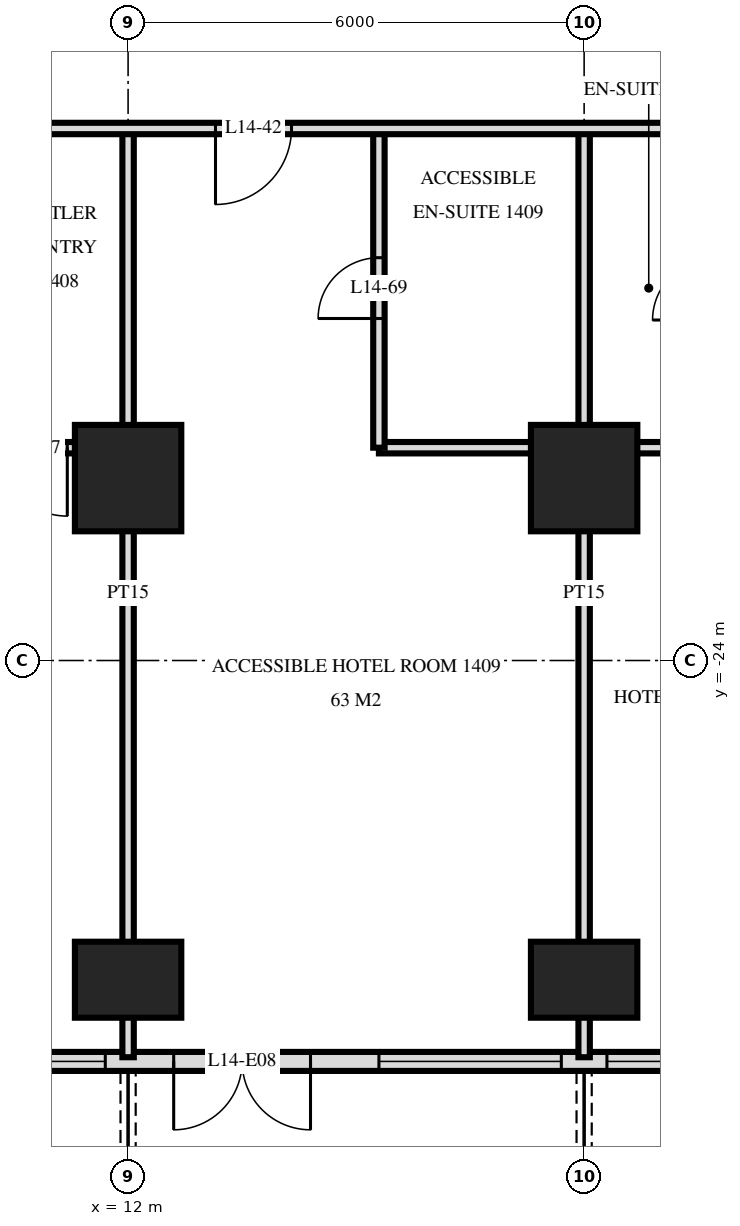
"""IFC4 building model, lengths in metres.
Left out: names, types, materials, properties, quantities, classifications, styles, units other than length and angle.
Written with IfcOpenShell. Run it as: python <this file> out.ifc"""

import sys

from ifc_helpers import new_model, si_unit, direction, frame, frame_2d, origin, origin_2d, place, context, subcontext, project, spatial, rectangle, extrude, element, fill, save


model = new_model("IFC4")
c1 = context("Model", 3, precision=1e-05, world=origin(), true_north=direction((0.0, 1.0)))
c2 = subcontext(c1, "Body", "Model", "MODEL_VIEW")
j1 = project(units=[si_unit("LENGTHUNIT", "METRE"), si_unit("PLANEANGLEUNIT", "RADIAN")], contexts=[c1])
p1 = place(None, origin())
s1 = spatial("IfcSite", under=j1, at=p1, CompositionType="ELEMENT")
p2 = place(p1, origin())
s2 = spatial("IfcBuilding", under=s1, at=p2, CompositionType="ELEMENT")
p3 = place(p2, frame((0.0, 0.0, 60.0)))
s3 = spatial("IfcBuildingStorey", under=s2, at=p3, CompositionType="ELEMENT", Elevation=60.0)
p4 = place(p3, frame((12.0, -28.2, 0.0), z_axis=(0.0, 0.0, 1.0), x_axis=(1.0, 0.0, 0.0)))
e1 = element("IfcColumn", 1, at=p4, inside=s3, PredefinedType="COLUMN", context=c2, shape_type="SweptSolid", body=[
    extrude(rectangle(XDim=1.4, YDim=1.0, at=origin_2d()), origin(), (0.0, 0.0, 1.0), 3.6),
])
p5 = place(p3, frame((12.0, -21.6, 0.0), z_axis=(0.0, 0.0, 1.0), x_axis=(1.0, 0.0, 0.0)))
e2 = element("IfcColumn", 2, at=p5, inside=s3, PredefinedType="COLUMN", context=c2, shape_type="SweptSolid", body=[
    extrude(rectangle(XDim=1.4, YDim=1.4, at=origin_2d()), origin(), (0.0, 0.0, 1.0), 3.6),
])
p6 = place(p3, frame((18.0, -28.2, 0.0), z_axis=(0.0, 0.0, 1.0), x_axis=(1.0, 0.0, 0.0)))
e3 = element("IfcColumn", 3, at=p6, inside=s3, PredefinedType="COLUMN", context=c2, shape_type="SweptSolid", body=[
    extrude(rectangle(XDim=1.4, YDim=1.0, at=origin_2d()), origin(), (0.0, 0.0, 1.0), 3.6),
])
p7 = place(p3, frame((18.0, -21.6, 0.0), z_axis=(0.0, 0.0, 1.0), x_axis=(1.0, 0.0, 0.0)))
e4 = element("IfcColumn", 4, at=p7, inside=s3, PredefinedType="COLUMN", context=c2, shape_type="SweptSolid", body=[
    extrude(rectangle(XDim=1.4, YDim=1.4, at=origin_2d()), origin(), (0.0, 0.0, 1.0), 3.6),
])
p8 = place(p3, frame((-28.775, -29.275, 0.0), z_axis=(0.0, 0.0, 1.0), x_axis=(1.0, 0.0, 0.0)))
e5 = element("IfcWall", 5, at=p8, inside=s3, PredefinedType="SOLIDWALL", context=c2, shape_type="SweptSolid", body=[
    extrude(rectangle(XDim=57.551, YDim=0.25, at=frame_2d((28.775, 0.0))), origin(), (0.0, 0.0, 1.0), 3.32),
])
p9 = place(p8, frame((0.575, 0.0, 0.0)))
e6 = element("IfcOpeningElement", 6, at=p9, cuts=e5, PredefinedType="OPENING", context=c2, shape_type="SweptSolid", body=[
    extrude(rectangle(XDim=1.8, YDim=2.4, at=frame_2d((0.9, 1.2))), frame((0.0, 0.135, 0.0), z_axis=(0.0, -1.0, 0.0), x_axis=(1.0, 0.0, 0.0)), (0.0, 0.0, 1.0), 0.27),
])
p10 = place(p8, frame((5.375, 0.0, 0.0)))
e7 = element("IfcOpeningElement", 7, at=p10, cuts=e5, PredefinedType="OPENING", context=c2, shape_type="SweptSolid", body=[
    extrude(rectangle(XDim=1.8, YDim=2.4, at=frame_2d((0.9, 1.2))), frame((0.0, 0.135, 0.0), z_axis=(0.0, -1.0, 0.0), x_axis=(1.0, 0.0, 0.0)), (0.0, 0.0, 1.0), 0.27),
])
p11 = place(p8, frame((8.075, 0.0, 0.3)))
e8 = element("IfcOpeningElement", 8, at=p11, cuts=e5, PredefinedType="OPENING", context=c2, shape_type="SweptSolid", body=[
    extrude(rectangle(XDim=2.4, YDim=2.1, at=frame_2d((1.2, 1.05))), frame((0.0, 0.135, 0.0), z_axis=(0.0, -1.0, 0.0), x_axis=(1.0, 0.0, 0.0)), (0.0, 0.0, 1.0), 0.27),
])
p12 = place(p8, frame((11.375, 0.0, 0.0)))
e9 = element("IfcOpeningElement", 9, at=p12, cuts=e5, PredefinedType="OPENING", context=c2, shape_type="SweptSolid", body=[
    extrude(rectangle(XDim=1.8, YDim=2.4, at=frame_2d((0.9, 1.2))), frame((0.0, 0.135, 0.0), z_axis=(0.0, -1.0, 0.0), x_axis=(1.0, 0.0, 0.0)), (0.0, 0.0, 1.0), 0.27),
])
p13 = place(p8, frame((14.075, 0.0, 0.3)))
e10 = element("IfcOpeningElement", 10, at=p13, cuts=e5, PredefinedType="OPENING", context=c2, shape_type="SweptSolid", body=[
    extrude(rectangle(XDim=2.4, YDim=2.1, at=frame_2d((1.2, 1.05))), frame((0.0, 0.135, 0.0), z_axis=(0.0, -1.0, 0.0), x_axis=(1.0, 0.0, 0.0)), (0.0, 0.0, 1.0), 0.27),
])
p14 = place(p8, frame((17.375, 0.0, 0.0)))
e11 = element("IfcOpeningElement", 11, at=p14, cuts=e5, PredefinedType="OPENING", context=c2, shape_type="SweptSolid", body=[
    extrude(rectangle(XDim=1.8, YDim=2.4, at=frame_2d((0.9, 1.2))), frame((0.0, 0.135, 0.0), z_axis=(0.0, -1.0, 0.0), x_axis=(1.0, 0.0, 0.0)), (0.0, 0.0, 1.0), 0.27),
])
p15 = place(p8, frame((20.075, 0.0, 0.3)))
e12 = element("IfcOpeningElement", 12, at=p15, cuts=e5, PredefinedType="OPENING", context=c2, shape_type="SweptSolid", body=[
    extrude(rectangle(XDim=2.4, YDim=2.1, at=frame_2d((1.2, 1.05))), frame((0.0, 0.135, 0.0), z_axis=(0.0, -1.0, 0.0), x_axis=(1.0, 0.0, 0.0)), (0.0, 0.0, 1.0), 0.27),
])
p16 = place(p8, frame((23.075, 0.0, 0.3)))
e13 = element("IfcOpeningElement", 13, at=p16, cuts=e5, PredefinedType="OPENING", context=c2, shape_type="SweptSolid", body=[
    extrude(rectangle(XDim=2.4, YDim=2.1, at=frame_2d((1.2, 1.05))), frame((0.0, 0.135, 0.0), z_axis=(0.0, -1.0, 0.0), x_axis=(1.0, 0.0, 0.0)), (0.0, 0.0, 1.0), 0.27),
])
p17 = place(p8, frame((26.375, 0.0, 0.0)))
e14 = element("IfcOpeningElement", 14, at=p17, cuts=e5, PredefinedType="OPENING", context=c2, shape_type="SweptSolid", body=[
    extrude(rectangle(XDim=1.8, YDim=2.4, at=frame_2d((0.9, 1.2))), frame((0.0, 0.135, 0.0), z_axis=(0.0, -1.0, 0.0), x_axis=(1.0, 0.0, 0.0)), (0.0, 0.0, 1.0), 0.27),
])
p18 = place(p8, frame((29.075, 0.0, 0.3)))
e15 = element("IfcOpeningElement", 15, at=p18, cuts=e5, PredefinedType="OPENING", context=c2, shape_type="SweptSolid", body=[
    extrude(rectangle(XDim=2.4, YDim=2.1, at=frame_2d((1.2, 1.05))), frame((0.0, 0.135, 0.0), z_axis=(0.0, -1.0, 0.0), x_axis=(1.0, 0.0, 0.0)), (0.0, 0.0, 1.0), 0.27),
])
p19 = place(p8, frame((32.375, 0.0, 0.0)))
e16 = element("IfcOpeningElement", 16, at=p19, cuts=e5, PredefinedType="OPENING", context=c2, shape_type="SweptSolid", body=[
    extrude(rectangle(XDim=1.8, YDim=2.4, at=frame_2d((0.9, 1.2))), frame((0.0, 0.135, 0.0), z_axis=(0.0, -1.0, 0.0), x_axis=(1.0, 0.0, 0.0)), (0.0, 0.0, 1.0), 0.27),
])
p20 = place(p8, frame((35.375, 0.0, 0.0)))
e17 = element("IfcOpeningElement", 17, at=p20, cuts=e5, PredefinedType="OPENING", context=c2, shape_type="SweptSolid", body=[
    extrude(rectangle(XDim=1.8, YDim=2.4, at=frame_2d((0.9, 1.2))), frame((0.0, 0.135, 0.0), z_axis=(0.0, -1.0, 0.0), x_axis=(1.0, 0.0, 0.0)), (0.0, 0.0, 1.0), 0.27),
])
p21 = place(p8, frame((38.075, 0.0, 0.3)))
e18 = element("IfcOpeningElement", 18, at=p21, cuts=e5, PredefinedType="OPENING", context=c2, shape_type="SweptSolid", body=[
    extrude(rectangle(XDim=2.4, YDim=2.1, at=frame_2d((1.2, 1.05))), frame((0.0, 0.135, 0.0), z_axis=(0.0, -1.0, 0.0), x_axis=(1.0, 0.0, 0.0)), (0.0, 0.0, 1.0), 0.27),
])
p22 = place(p8, frame((41.375, 0.0, 0.0)))
e19 = element("IfcOpeningElement", 19, at=p22, cuts=e5, PredefinedType="OPENING", context=c2, shape_type="SweptSolid", body=[
    extrude(rectangle(XDim=1.8, YDim=2.4, at=frame_2d((0.9, 1.2))), frame((0.0, 0.135, 0.0), z_axis=(0.0, -1.0, 0.0), x_axis=(1.0, 0.0, 0.0)), (0.0, 0.0, 1.0), 0.27),
])
p23 = place(p8, frame((44.075, 0.0, 0.3)))
e20 = element("IfcOpeningElement", 20, at=p23, cuts=e5, PredefinedType="OPENING", context=c2, shape_type="SweptSolid", body=[
    extrude(rectangle(XDim=2.4, YDim=2.1, at=frame_2d((1.2, 1.05))), frame((0.0, 0.135, 0.0), z_axis=(0.0, -1.0, 0.0), x_axis=(1.0, 0.0, 0.0)), (0.0, 0.0, 1.0), 0.27),
])
p24 = place(p8, frame((47.075, 0.0, 0.3)))
e21 = element("IfcOpeningElement", 21, at=p24, cuts=e5, PredefinedType="OPENING", context=c2, shape_type="SweptSolid", body=[
    extrude(rectangle(XDim=2.4, YDim=2.1, at=frame_2d((1.2, 1.05))), frame((0.0, 0.135, 0.0), z_axis=(0.0, -1.0, 0.0), x_axis=(1.0, 0.0, 0.0)), (0.0, 0.0, 1.0), 0.27),
])
p25 = place(p8, frame((50.375, 0.0, 0.0)))
e22 = element("IfcOpeningElement", 22, at=p25, cuts=e5, PredefinedType="OPENING", context=c2, shape_type="SweptSolid", body=[
    extrude(rectangle(XDim=1.8, YDim=2.4, at=frame_2d((0.9, 1.2))), frame((0.0, 0.135, 0.0), z_axis=(0.0, -1.0, 0.0), x_axis=(1.0, 0.0, 0.0)), (0.0, 0.0, 1.0), 0.27),
])
p26 = place(p8, frame((53.375, 0.0, 0.0)))
e23 = element("IfcOpeningElement", 23, at=p26, cuts=e5, PredefinedType="OPENING", context=c2, shape_type="SweptSolid", body=[
    extrude(rectangle(XDim=1.8, YDim=2.4, at=frame_2d((0.9, 1.2))), frame((0.0, 0.135, 0.0), z_axis=(0.0, -1.0, 0.0), x_axis=(1.0, 0.0, 0.0)), (0.0, 0.0, 1.0), 0.27),
])
p27 = place(p3, frame((18.0, -29.22, 0.0), z_axis=(0.0, 0.0, 1.0), x_axis=(0.0, 1.0, 0.0)))
e24 = element("IfcWall", 24, at=p27, inside=s3, PredefinedType="PARTITIONING", context=c2, shape_type="SweptSolid", body=[
    extrude(rectangle(XDim=12.22, YDim=0.15, at=frame_2d((6.11, 0.0))), origin(), (0.0, 0.0, 1.0), 3.32),
])
p28 = place(p3, frame((15.3, -21.2, 0.0), z_axis=(0.0, 0.0, 1.0), x_axis=(0.0, 1.0, 0.0)))
e25 = element("IfcWall", 25, at=p28, inside=s3, PredefinedType="PARTITIONING", context=c2, shape_type="SweptSolid", body=[
    extrude(rectangle(XDim=4.2, YDim=0.15, at=frame_2d((2.1, 0.0))), origin(), (0.0, 0.0, 1.0), 3.32),
])
p29 = place(p28, frame((1.7, 0.0, 0.0)))
e26 = element("IfcOpeningElement", 26, at=p29, cuts=e25, PredefinedType="OPENING", context=c2, shape_type="SweptSolid", body=[
    extrude(rectangle(XDim=0.8, YDim=2.1, at=frame_2d((0.4, 1.05))), frame((0.0, 0.085, 0.0), z_axis=(0.0, -1.0, 0.0), x_axis=(1.0, 0.0, 0.0)), (0.0, 0.0, 1.0), 0.17),
])
p30 = place(p3, frame((12.0, -29.22, 0.0), z_axis=(0.0, 0.0, 1.0), x_axis=(0.0, 1.0, 0.0)))
e27 = element("IfcWall", 27, at=p30, inside=s3, PredefinedType="PARTITIONING", context=c2, shape_type="SweptSolid", body=[
    extrude(rectangle(XDim=12.22, YDim=0.15, at=frame_2d((6.11, 0.0))), origin(), (0.0, 0.0, 1.0), 3.32),
])
p31 = place(p3, frame((4.2, -21.2, 0.0), z_axis=(0.0, 0.0, 1.0), x_axis=(1.0, 0.0, 0.0)))
e28 = element("IfcWall", 28, at=p31, inside=s3, PredefinedType="PARTITIONING", context=c2, shape_type="SweptSolid", body=[
    extrude(rectangle(XDim=7.8, YDim=0.15, at=frame_2d((3.9, 0.0))), origin(), (0.0, 0.0, 1.0), 3.32),
])
p32 = place(p31, frame((0.2, 0.0, 0.0)))
e29 = element("IfcOpeningElement", 29, at=p32, cuts=e28, PredefinedType="OPENING", context=c2, shape_type="SweptSolid", body=[
    extrude(rectangle(XDim=0.8, YDim=2.1, at=frame_2d((0.4, 1.05))), frame((0.0, 0.085, 0.0), z_axis=(0.0, -1.0, 0.0), x_axis=(1.0, 0.0, 0.0)), (0.0, 0.0, 1.0), 0.17),
])
p33 = place(p31, frame((4.03, 0.0, 0.0)))
e30 = element("IfcOpeningElement", 30, at=p33, cuts=e28, PredefinedType="OPENING", context=c2, shape_type="SweptSolid", body=[
    extrude(rectangle(XDim=0.9, YDim=2.1, at=frame_2d((0.45, 1.05))), frame((0.0, 0.085, 0.0), z_axis=(0.0, -1.0, 0.0), x_axis=(1.0, 0.0, 0.0)), (0.0, 0.0, 1.0), 0.17),
])
p34 = place(p31, frame((6.1, 0.0, 0.0)))
e31 = element("IfcOpeningElement", 31, at=p34, cuts=e28, PredefinedType="OPENING", context=c2, shape_type="SweptSolid", body=[
    extrude(rectangle(XDim=0.9, YDim=2.1, at=frame_2d((0.45, 1.05))), frame((0.0, 0.085, 0.0), z_axis=(0.0, -1.0, 0.0), x_axis=(1.0, 0.0, 0.0)), (0.0, 0.0, 1.0), 0.17),
])
p35 = place(p3, frame((15.3, -21.2, 0.0), z_axis=(0.0, 0.0, 1.0), x_axis=(1.0, 0.0, 0.0)))
e32 = element("IfcWall", 32, at=p35, inside=s3, PredefinedType="PARTITIONING", context=c2, shape_type="SweptSolid", body=[
    extrude(rectangle(XDim=4.4, YDim=0.15, at=frame_2d((2.2, 0.0))), origin(), (0.0, 0.0, 1.0), 3.32),
])
p36 = place(p3, frame((-33.12, -17.0, 0.0), z_axis=(0.0, 0.0, 1.0), x_axis=(1.0, 0.0, 0.0)))
e33 = element("IfcWall", 33, at=p36, inside=s3, PredefinedType="PARTITIONING", context=c2, shape_type="SweptSolid", body=[
    extrude(rectangle(XDim=66.24, YDim=0.15, at=frame_2d((33.12, 0.0))), origin(), (0.0, 0.0, 1.0), 3.32),
])
p37 = place(p36, frame((12.27, 0.0, 0.0)))
e34 = element("IfcOpeningElement", 34, at=p37, cuts=e33, PredefinedType="OPENING", context=c2, shape_type="SweptSolid", body=[
    extrude(rectangle(XDim=1.0, YDim=2.1, at=frame_2d((0.5, 1.05))), frame((0.0, 0.085, 0.0), z_axis=(0.0, -1.0, 0.0), x_axis=(1.0, 0.0, 0.0)), (0.0, 0.0, 1.0), 0.17),
])
p38 = place(p36, frame((16.97, 0.0, 0.0)))
e35 = element("IfcOpeningElement", 35, at=p38, cuts=e33, PredefinedType="OPENING", context=c2, shape_type="SweptSolid", body=[
    extrude(rectangle(XDim=1.0, YDim=2.1, at=frame_2d((0.5, 1.05))), frame((0.0, 0.085, 0.0), z_axis=(0.0, -1.0, 0.0), x_axis=(1.0, 0.0, 0.0)), (0.0, 0.0, 1.0), 0.17),
])
p39 = place(p36, frame((18.27, 0.0, 0.0)))
e36 = element("IfcOpeningElement", 36, at=p39, cuts=e33, PredefinedType="OPENING", context=c2, shape_type="SweptSolid", body=[
    extrude(rectangle(XDim=1.0, YDim=2.1, at=frame_2d((0.5, 1.05))), frame((0.0, 0.085, 0.0), z_axis=(0.0, -1.0, 0.0), x_axis=(1.0, 0.0, 0.0)), (0.0, 0.0, 1.0), 0.17),
])
p40 = place(p36, frame((22.97, 0.0, 0.0)))
e37 = element("IfcOpeningElement", 37, at=p40, cuts=e33, PredefinedType="OPENING", context=c2, shape_type="SweptSolid", body=[
    extrude(rectangle(XDim=1.0, YDim=2.1, at=frame_2d((0.5, 1.05))), frame((0.0, 0.085, 0.0), z_axis=(0.0, -1.0, 0.0), x_axis=(1.0, 0.0, 0.0)), (0.0, 0.0, 1.0), 0.17),
])
p41 = place(p36, frame((24.27, 0.0, 0.0)))
e38 = element("IfcOpeningElement", 38, at=p41, cuts=e33, PredefinedType="OPENING", context=c2, shape_type="SweptSolid", body=[
    extrude(rectangle(XDim=1.0, YDim=2.1, at=frame_2d((0.5, 1.05))), frame((0.0, 0.085, 0.0), z_axis=(0.0, -1.0, 0.0), x_axis=(1.0, 0.0, 0.0)), (0.0, 0.0, 1.0), 0.17),
])
p42 = place(p36, frame((28.97, 0.0, 0.0)))
e39 = element("IfcOpeningElement", 39, at=p42, cuts=e33, PredefinedType="OPENING", context=c2, shape_type="SweptSolid", body=[
    extrude(rectangle(XDim=1.0, YDim=2.1, at=frame_2d((0.5, 1.05))), frame((0.0, 0.085, 0.0), z_axis=(0.0, -1.0, 0.0), x_axis=(1.0, 0.0, 0.0)), (0.0, 0.0, 1.0), 0.17),
])
p43 = place(p36, frame((30.27, 0.0, 0.0)))
e40 = element("IfcOpeningElement", 40, at=p43, cuts=e33, PredefinedType="OPENING", context=c2, shape_type="SweptSolid", body=[
    extrude(rectangle(XDim=1.0, YDim=2.1, at=frame_2d((0.5, 1.05))), frame((0.0, 0.085, 0.0), z_axis=(0.0, -1.0, 0.0), x_axis=(1.0, 0.0, 0.0)), (0.0, 0.0, 1.0), 0.17),
])
p44 = place(p36, frame((33.82, 0.0, 0.0)))
e41 = element("IfcOpeningElement", 41, at=p44, cuts=e33, PredefinedType="OPENING", context=c2, shape_type="SweptSolid", body=[
    extrude(rectangle(XDim=1.0, YDim=2.1, at=frame_2d((0.5, 1.05))), frame((0.0, 0.085, 0.0), z_axis=(0.0, -1.0, 0.0), x_axis=(1.0, 0.0, 0.0)), (0.0, 0.0, 1.0), 0.17),
])
p45 = place(p36, frame((46.27, 0.0, 0.0)))
e42 = element("IfcOpeningElement", 42, at=p45, cuts=e33, PredefinedType="OPENING", context=c2, shape_type="SweptSolid", body=[
    extrude(rectangle(XDim=1.0, YDim=2.1, at=frame_2d((0.5, 1.05))), frame((0.0, 0.085, 0.0), z_axis=(0.0, -1.0, 0.0), x_axis=(1.0, 0.0, 0.0)), (0.0, 0.0, 1.0), 0.17),
])
p46 = place(p36, frame((52.97, 0.0, 0.0)))
e43 = element("IfcOpeningElement", 43, at=p46, cuts=e33, PredefinedType="OPENING", context=c2, shape_type="SweptSolid", body=[
    extrude(rectangle(XDim=1.0, YDim=2.1, at=frame_2d((0.5, 1.05))), frame((0.0, 0.085, 0.0), z_axis=(0.0, -1.0, 0.0), x_axis=(1.0, 0.0, 0.0)), (0.0, 0.0, 1.0), 0.17),
])
p47 = place(p36, frame((6.05, 0.0, 0.0)))
e44 = element("IfcOpeningElement", 44, at=p47, cuts=e33, PredefinedType="OPENING", context=c2, shape_type="SweptSolid", body=[
    extrude(rectangle(XDim=1.0, YDim=2.1, at=frame_2d((0.5, 1.05))), frame((0.0, 0.085, 0.0), z_axis=(0.0, -1.0, 0.0), x_axis=(1.0, 0.0, 0.0)), (0.0, 0.0, 1.0), 0.17),
])
p48 = place(p36, frame((59.15, 0.0, 0.0)))
e45 = element("IfcOpeningElement", 45, at=p48, cuts=e33, PredefinedType="OPENING", context=c2, shape_type="SweptSolid", body=[
    extrude(rectangle(XDim=1.0, YDim=2.1, at=frame_2d((0.5, 1.05))), frame((0.0, 0.085, 0.0), z_axis=(0.0, -1.0, 0.0), x_axis=(1.0, 0.0, 0.0)), (0.0, 0.0, 1.0), 0.17),
])
p49 = place(p21, origin())
e46 = element("IfcWindow", 46, at=p49, inside=s3, PartitioningType="SINGLE_PANEL", PredefinedType="WINDOW", context=c2, shape_type="SweptSolid", body=[
    extrude(rectangle(XDim=2.4, YDim=2.1, at=frame_2d((1.2, 1.05))), frame((0.0, 0.03, 0.0), z_axis=(0.0, -1.0, 0.0), x_axis=(1.0, 0.0, 0.0)), (0.0, 0.0, 1.0), 0.06),
])
fill(e18, e46)
p50 = place(p22, frame((0.9, 0.0, 0.0), z_axis=(0.0, 0.0, 1.0), x_axis=(-1.0, 0.0, 0.0)))
e47 = element("IfcDoor", 47, at=p50, inside=s3, OperationType="DOUBLE_DOOR_SINGLE_SWING", PredefinedType="DOOR", context=c2, shape_type="SweptSolid", body=[
    extrude(rectangle(XDim=1.8, YDim=2.4, at=frame_2d((0.0, 1.2))), frame((0.0, -0.025, 0.0), z_axis=(0.0, 1.0, 0.0), x_axis=(-1.0, 0.0, 0.0)), (0.0, 0.0, 1.0), 0.05),
])
fill(e19, e47)
p51 = place(p23, origin())
e48 = element("IfcWindow", 48, at=p51, inside=s3, PartitioningType="SINGLE_PANEL", PredefinedType="WINDOW", context=c2, shape_type="SweptSolid", body=[
    extrude(rectangle(XDim=2.4, YDim=2.1, at=frame_2d((1.2, 1.05))), frame((0.0, 0.03, 0.0), z_axis=(0.0, -1.0, 0.0), x_axis=(1.0, 0.0, 0.0)), (0.0, 0.0, 1.0), 0.06),
])
fill(e20, e48)
p52 = place(p24, origin())
e49 = element("IfcWindow", 49, at=p52, inside=s3, PartitioningType="SINGLE_PANEL", PredefinedType="WINDOW", context=c2, shape_type="SweptSolid", body=[
    extrude(rectangle(XDim=2.4, YDim=2.1, at=frame_2d((1.2, 1.05))), frame((0.0, 0.03, 0.0), z_axis=(0.0, -1.0, 0.0), x_axis=(1.0, 0.0, 0.0)), (0.0, 0.0, 1.0), 0.06),
])
fill(e21, e49)
p53 = place(p45, frame((0.5, 0.0, 0.0), z_axis=(0.0, 0.0, 1.0), x_axis=(-1.0, 0.0, 0.0)))
e50 = element("IfcDoor", 50, at=p53, inside=s3, OperationType="SINGLE_SWING_LEFT", PredefinedType="DOOR", context=c2, shape_type="SweptSolid", body=[
    extrude(rectangle(XDim=1.0, YDim=2.1, at=frame_2d((0.0, 1.05))), frame((0.0, -0.025, 0.0), z_axis=(0.0, 1.0, 0.0), x_axis=(-1.0, 0.0, 0.0)), (0.0, 0.0, 1.0), 0.05),
])
fill(e42, e50)
p54 = place(p34, frame((0.45, 0.0, 0.0), z_axis=(0.0, 0.0, 1.0), x_axis=(-1.0, 0.0, 0.0)))
e51 = element("IfcDoor", 51, at=p54, inside=s3, OperationType="SINGLE_SWING_RIGHT", PredefinedType="DOOR", context=c2, shape_type="SweptSolid", body=[
    extrude(rectangle(XDim=0.9, YDim=2.1, at=frame_2d((0.0, 1.05))), frame((0.0, -0.025, 0.0), z_axis=(0.0, 1.0, 0.0), x_axis=(-1.0, 0.0, 0.0)), (0.0, 0.0, 1.0), 0.05),
])
fill(e31, e51)
p55 = place(p29, origin())
e52 = element("IfcDoor", 52, at=p55, inside=s3, OperationType="SINGLE_SWING_RIGHT", PredefinedType="DOOR", context=c2, shape_type="SweptSolid", body=[
    extrude(rectangle(XDim=0.8, YDim=2.1, at=frame_2d((0.4, 1.05))), frame((0.0, 0.025, 0.0), z_axis=(0.0, -1.0, 0.0), x_axis=(1.0, 0.0, 0.0)), (0.0, 0.0, 1.0), 0.05),
])
fill(e26, e52)
save(model, sys.argv[1])
